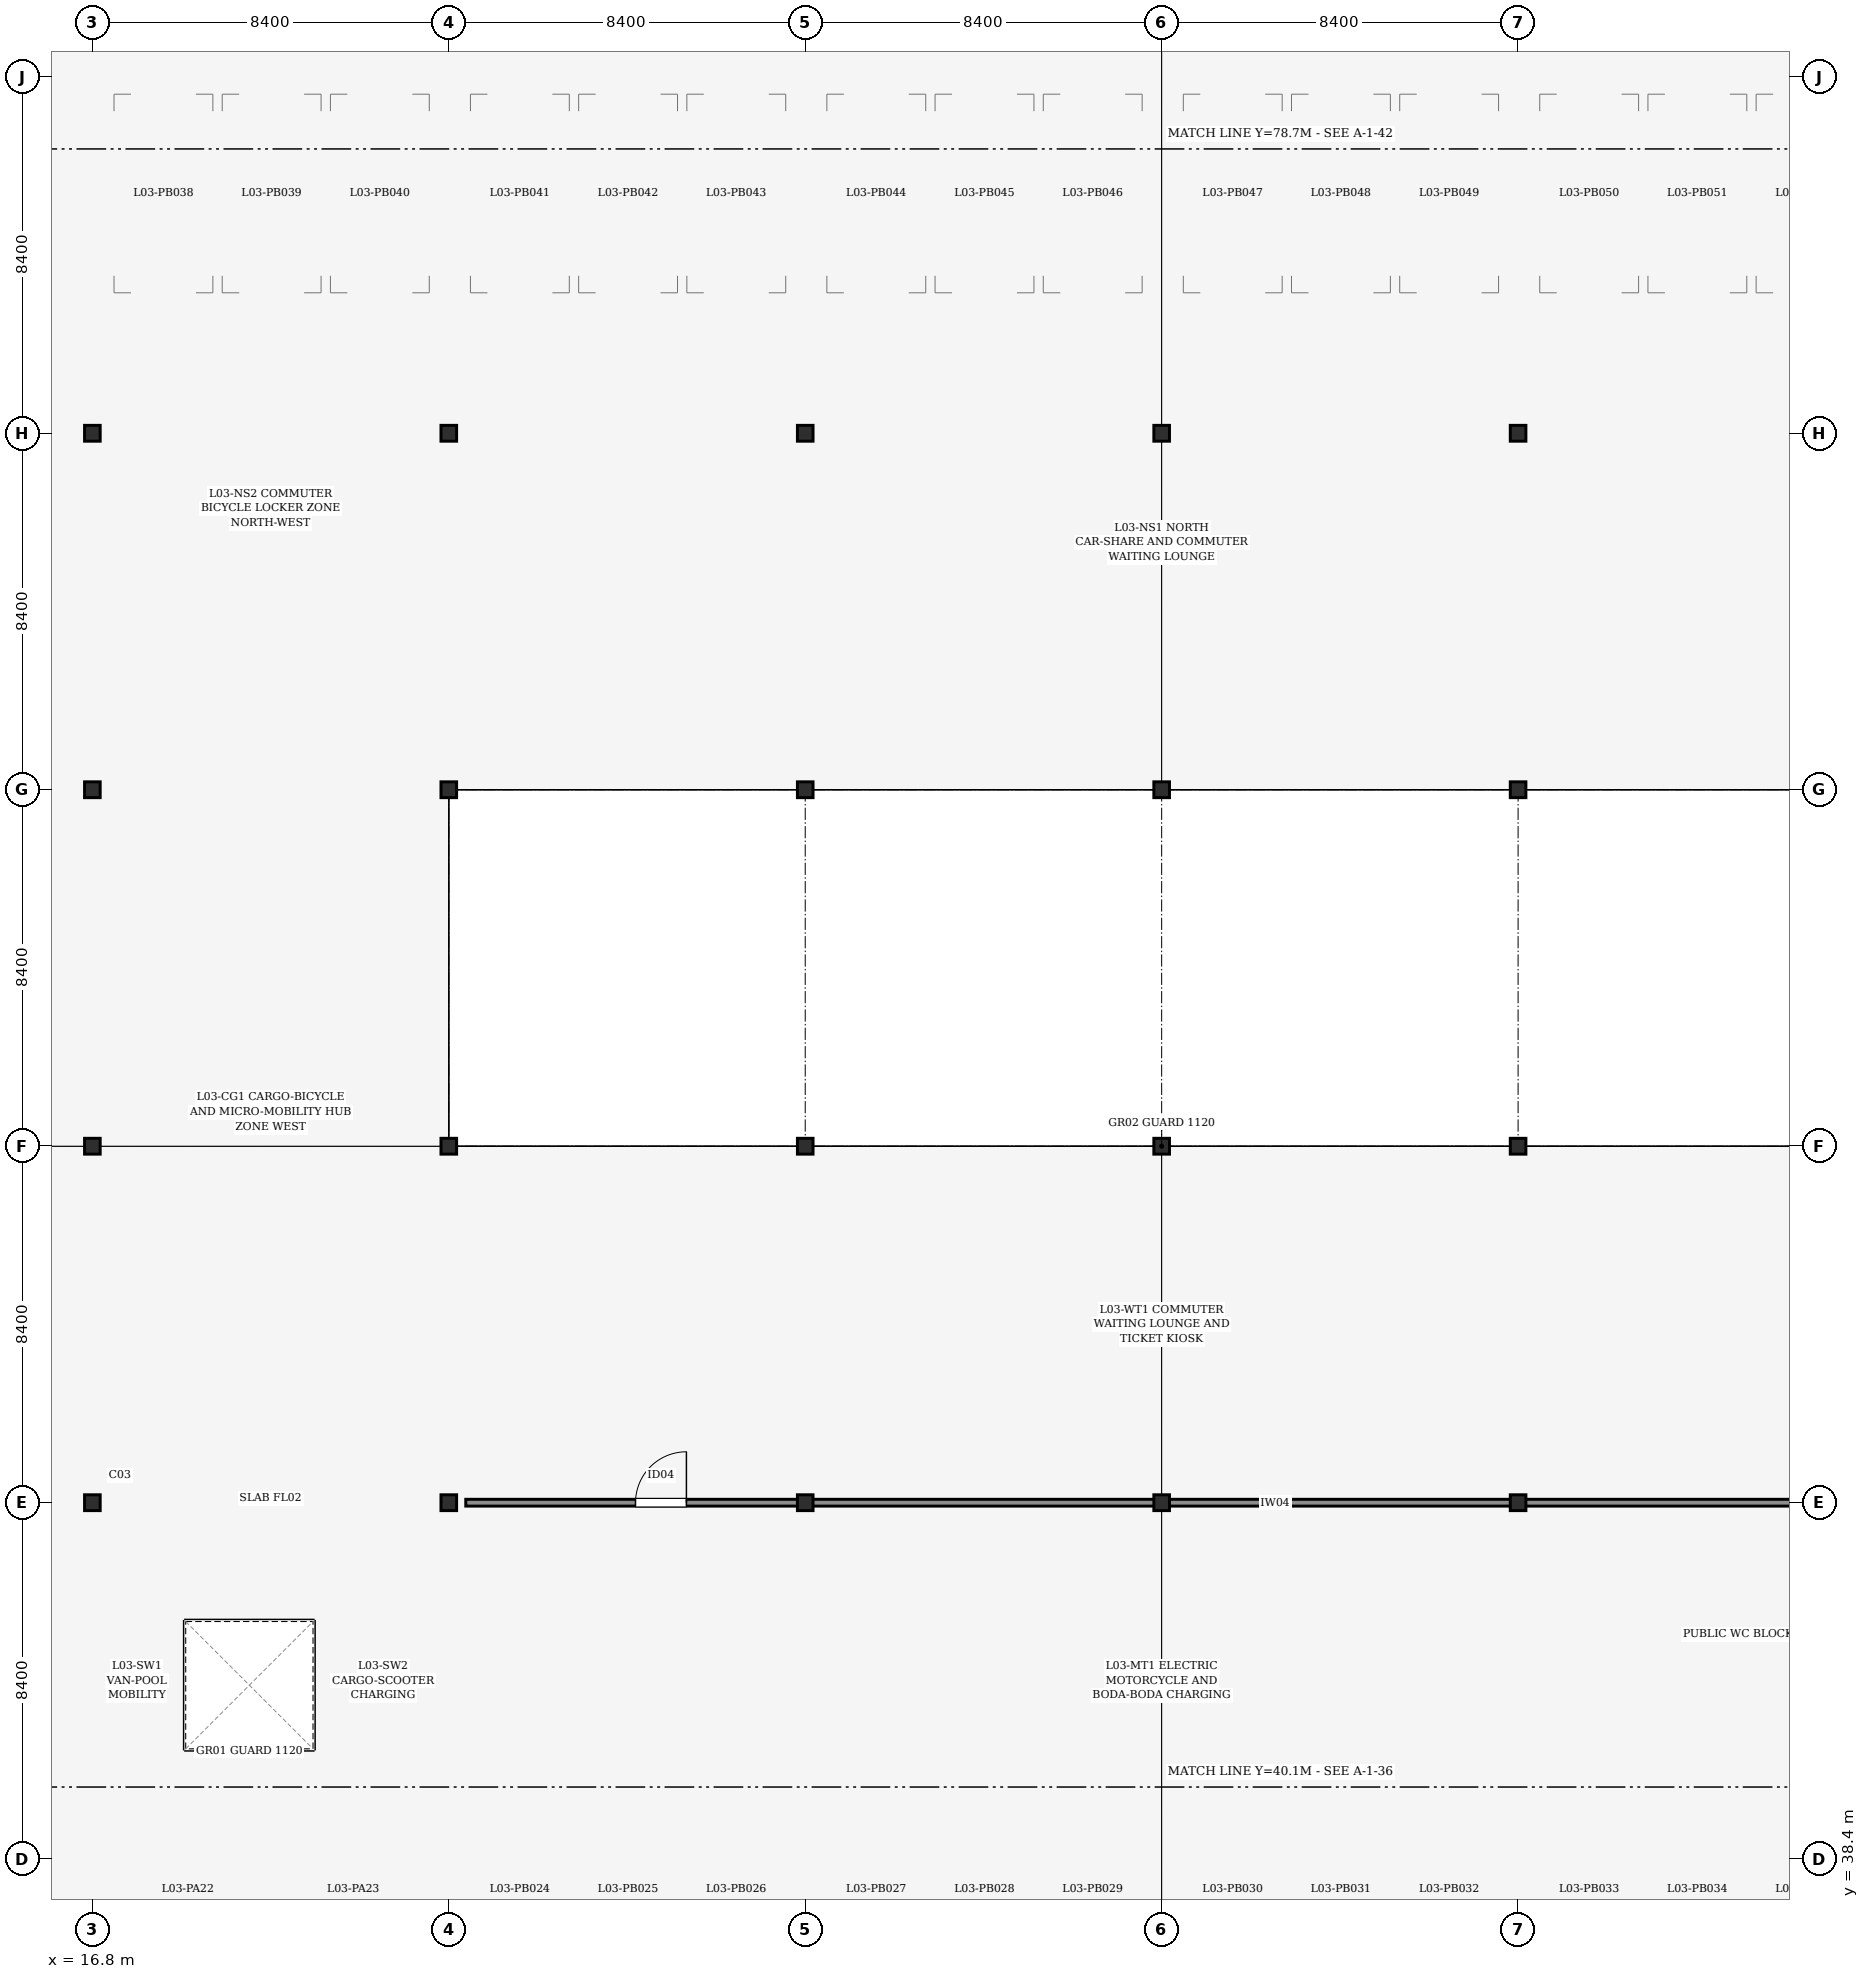
"""IFC4 building model, lengths in metres.
Left out: names, types, materials, properties, quantities, classifications, styles, units other than length and angle.
Written with IfcOpenShell. Run it as: python <this file> out.ifc"""

import sys

from ifc_helpers import new_model, si_unit, direction, frame, frame_2d, origin, origin_2d, place, context, subcontext, project, spatial, rectangle, i_section, extrude, element, fill, save


model = new_model("IFC4")
c1 = context("Model", 3, precision=1e-05, world=origin(), true_north=direction((0.0, 1.0)))
c2 = subcontext(c1, "Body", "Model", "MODEL_VIEW")
j1 = project(units=[si_unit("LENGTHUNIT", "METRE"), si_unit("PLANEANGLEUNIT", "RADIAN")], contexts=[c1])
p1 = place(None, origin())
s1 = spatial("IfcSite", under=j1, at=p1, CompositionType="ELEMENT")
p2 = place(p1, origin())
s2 = spatial("IfcBuilding", under=s1, at=p2, CompositionType="ELEMENT")
p3 = place(p2, frame((0.0, 0.0, 12.6)))
s3 = spatial("IfcBuildingStorey", under=s2, at=p3, CompositionType="ELEMENT", Elevation=12.6)
for number, where, z_axis, x_axis in (
    (1, (16.8, 38.4, 0.0), (0.0, 0.0, 1.0), (1.0, 0.0, 0.0)),
    (2, (16.8, 46.8, 0.0), (0.0, 0.0, 1.0), (1.0, 0.0, 0.0)),
    (3, (16.8, 55.2, 0.0), (0.0, 0.0, 1.0), (1.0, 0.0, 0.0)),
    (4, (16.8, 63.6, 0.0), (0.0, 0.0, 1.0), (1.0, 0.0, 0.0)),
    (5, (16.8, 72.0, 0.0), (0.0, 0.0, 1.0), (1.0, 0.0, 0.0)),
    (6, (16.8, 80.4, 0.0), (0.0, 0.0, 1.0), (1.0, 0.0, 0.0)),
    (7, (25.2, 38.4, 0.0), (0.0, 0.0, 1.0), (1.0, 0.0, 0.0)),
    (8, (25.2, 46.8, 0.0), (0.0, 0.0, 1.0), (1.0, 0.0, 0.0)),
    (9, (25.2, 55.2, 0.0), (0.0, 0.0, 1.0), (1.0, 0.0, 0.0)),
    (10, (25.2, 63.6, 0.0), (0.0, 0.0, 1.0), (1.0, 0.0, 0.0)),
    (11, (25.2, 72.0, 0.0), (0.0, 0.0, 1.0), (1.0, 0.0, 0.0)),
    (12, (25.2, 80.4, 0.0), (0.0, 0.0, 1.0), (1.0, 0.0, 0.0)),
    (13, (33.6, 38.4, 0.0), (0.0, 0.0, 1.0), (1.0, 0.0, 0.0)),
    (14, (33.6, 46.8, 0.0), (0.0, 0.0, 1.0), (1.0, 0.0, 0.0)),
    (15, (33.6, 55.2, 0.0), (0.0, 0.0, 1.0), (1.0, 0.0, 0.0)),
    (16, (33.6, 63.6, 0.0), (0.0, 0.0, 1.0), (1.0, 0.0, 0.0)),
    (17, (33.6, 72.0, 0.0), (0.0, 0.0, 1.0), (1.0, 0.0, 0.0)),
    (18, (33.6, 80.4, 0.0), (0.0, 0.0, 1.0), (1.0, 0.0, 0.0)),
    (19, (42.0, 38.4, 0.0), (0.0, 0.0, 1.0), (1.0, 0.0, 0.0)),
    (20, (42.0, 46.8, 0.0), (0.0, 0.0, 1.0), (1.0, 0.0, 0.0)),
    (21, (42.0, 55.2, 0.0), (0.0, 0.0, 1.0), (1.0, 0.0, 0.0)),
    (22, (42.0, 63.6, 0.0), (0.0, 0.0, 1.0), (1.0, 0.0, 0.0)),
    (23, (42.0, 72.0, 0.0), (0.0, 0.0, 1.0), (1.0, 0.0, 0.0)),
    (24, (42.0, 80.4, 0.0), (0.0, 0.0, 1.0), (1.0, 0.0, 0.0)),
    (25, (50.4, 38.4, 0.0), (0.0, 0.0, 1.0), (1.0, 0.0, 0.0)),
    (26, (50.4, 46.8, 0.0), (0.0, 0.0, 1.0), (1.0, 0.0, 0.0)),
    (27, (50.4, 55.2, 0.0), (0.0, 0.0, 1.0), (1.0, 0.0, 0.0)),
    (28, (50.4, 63.6, 0.0), (0.0, 0.0, 1.0), (1.0, 0.0, 0.0)),
    (29, (50.4, 72.0, 0.0), (0.0, 0.0, 1.0), (1.0, 0.0, 0.0)),
    (30, (50.4, 80.4, 0.0), (0.0, 0.0, 1.0), (1.0, 0.0, 0.0)),
):
    element("IfcColumn", number, at=place(p3, frame(where, z_axis=z_axis, x_axis=x_axis)), inside=s3, PredefinedType="COLUMN", context=c2, shape_type="SweptSolid", body=[
        extrude(i_section(OverallWidth=0.373, OverallDepth=0.368, WebThickness=0.014, FlangeThickness=0.024, FilletRadius=0.015, at=origin_2d()), origin(), (0.0, 0.0, 1.0), 3.6),
    ])
p4 = place(p3, frame((25.6, 46.8, 0.0), z_axis=(0.0, 0.0, 1.0), x_axis=(1.0, 0.0, 0.0)))
e31 = element("IfcWall", 31, at=p4, inside=s3, PredefinedType="PARTITIONING", context=c2, shape_type="SweptSolid", body=[
    extrude(rectangle(XDim=32.8, YDim=0.16, at=frame_2d((16.4, 0.0))), origin(), (0.0, 0.0, 1.0), 2.525),
])
p5 = place(p4, frame((4.0, 0.0, 0.0)))
e32 = element("IfcOpeningElement", 32, at=p5, cuts=e31, PredefinedType="OPENING", context=c2, shape_type="SweptSolid", body=[
    extrude(rectangle(XDim=1.2, YDim=2.15, at=frame_2d((0.6, 1.075))), frame((0.0, 0.09, 0.0), z_axis=(0.0, -1.0, 0.0), x_axis=(1.0, 0.0, 0.0)), (0.0, 0.0, 1.0), 0.18),
])
p6 = place(p5, origin())
e33 = element("IfcDoor", 33, at=p6, inside=s3, OperationType="SINGLE_SWING_RIGHT", PredefinedType="DOOR", context=c2, shape_type="SweptSolid", body=[
    extrude(rectangle(XDim=1.2, YDim=2.15, at=frame_2d((0.6, 1.075))), frame((0.0, 0.025, 0.0), z_axis=(0.0, -1.0, 0.0), x_axis=(1.0, 0.0, 0.0)), (0.0, 0.0, 1.0), 0.05),
])
fill(e32, e33)
save(model, sys.argv[1])
